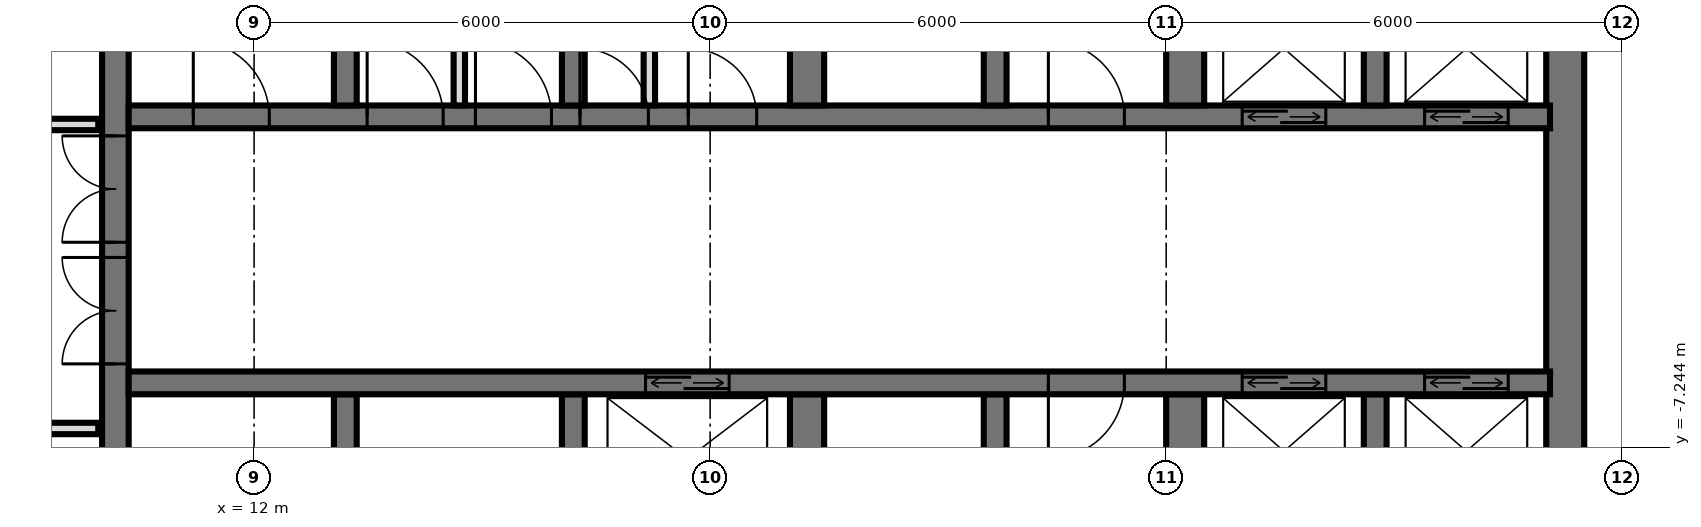
"""IFC4 building model, lengths in metres.
Left out: names, types, materials, properties, quantities, classifications, styles, units other than length and angle.
Written with IfcOpenShell. Run it as: python <this file> out.ifc"""

import sys

from ifc_helpers import new_model, si_unit, direction, frame, frame_2d, origin, place, context, subcontext, project, spatial, rectangle, extrude, element, fill, save


model = new_model("IFC4")
c1 = context("Model", 3, precision=1e-05, world=origin(), true_north=direction((0.0, 1.0)))
c2 = subcontext(c1, "Body", "Model", "MODEL_VIEW")
j1 = project(units=[si_unit("LENGTHUNIT", "METRE"), si_unit("PLANEANGLEUNIT", "RADIAN")], contexts=[c1])
p1 = place(None, origin())
s1 = spatial("IfcSite", under=j1, at=p1, CompositionType="ELEMENT")
p2 = place(p1, origin())
s2 = spatial("IfcBuilding", under=s1, at=p2, CompositionType="ELEMENT")
p3 = place(p2, frame((0.0, 0.0, 38.4)))
s3 = spatial("IfcBuildingStorey", under=s2, at=p3, CompositionType="ELEMENT", Elevation=38.4)
p4 = place(p3, frame((10.175, -14.55, 0.0), z_axis=(0.0, 0.0, 1.0), x_axis=(0.0, 1.0, 0.0)))
e1 = element("IfcWall", 1, at=p4, inside=s3, PredefinedType="SHEAR", context=c2, shape_type="SweptSolid", body=[
    extrude(rectangle(XDim=14.1, YDim=0.35, at=frame_2d((7.05, 0.0))), origin(), (0.0, 0.0, 1.0), 3.6),
])
p5 = place(p4, frame((8.4, 0.0, 0.0)))
e2 = element("IfcOpeningElement", 2, at=p5, cuts=e1, PredefinedType="OPENING", context=c2, shape_type="SweptSolid", body=[
    extrude(rectangle(XDim=1.4, YDim=2.4, at=frame_2d((0.7, 1.2))), frame((0.0, 0.185, 0.0), z_axis=(0.0, -1.0, 0.0), x_axis=(1.0, 0.0, 0.0)), (0.0, 0.0, 1.0), 0.37),
])
p6 = place(p4, frame((10.0, 0.0, 0.0)))
e3 = element("IfcOpeningElement", 3, at=p6, cuts=e1, PredefinedType="OPENING", context=c2, shape_type="SweptSolid", body=[
    extrude(rectangle(XDim=1.4, YDim=2.4, at=frame_2d((0.7, 1.2))), frame((0.0, 0.185, 0.0), z_axis=(0.0, -1.0, 0.0), x_axis=(1.0, 0.0, 0.0)), (0.0, 0.0, 1.0), 0.37),
])
p7 = place(p4, frame((4.0, 0.0, 0.0)))
e4 = element("IfcOpeningElement", 4, at=p7, cuts=e1, PredefinedType="OPENING", context=c2, shape_type="SweptSolid", body=[
    extrude(rectangle(XDim=1.2, YDim=2.1, at=frame_2d((0.6, 1.05))), frame((0.0, 0.185, 0.0), z_axis=(0.0, -1.0, 0.0), x_axis=(1.0, 0.0, 0.0)), (0.0, 0.0, 1.0), 0.37),
])
p8 = place(p3, frame((29.25, -14.55, 0.0), z_axis=(0.0, 0.0, 1.0), x_axis=(0.0, 1.0, 0.0)))
e5 = element("IfcWall", 5, at=p8, inside=s3, PredefinedType="SHEAR", context=c2, shape_type="SweptSolid", body=[
    extrude(rectangle(XDim=14.1, YDim=0.5, at=frame_2d((7.05, 0.0))), origin(), (0.0, 0.0, 1.0), 3.6),
])
p9 = place(p3, frame((10.35, -2.9, 0.0), z_axis=(0.0, 0.0, 1.0), x_axis=(1.0, 0.0, 0.0)))
e6 = element("IfcWall", 6, at=p9, inside=s3, PredefinedType="SHEAR", context=c2, shape_type="SweptSolid", body=[
    extrude(rectangle(XDim=18.7, YDim=0.3, at=frame_2d((9.35, 0.0))), origin(), (0.0, 0.0, 1.0), 3.6),
])
p10 = place(p9, frame((14.65, 0.0, 0.0)))
e7 = element("IfcOpeningElement", 7, at=p10, cuts=e6, PredefinedType="OPENING", context=c2, shape_type="SweptSolid", body=[
    extrude(rectangle(XDim=1.1, YDim=2.1, at=frame_2d((0.55, 1.05))), frame((0.0, 0.16, 0.0), z_axis=(0.0, -1.0, 0.0), x_axis=(1.0, 0.0, 0.0)), (0.0, 0.0, 1.0), 0.32),
])
p11 = place(p9, frame((17.05, 0.0, 0.0)))
e8 = element("IfcOpeningElement", 8, at=p11, cuts=e6, PredefinedType="OPENING", context=c2, shape_type="SweptSolid", body=[
    extrude(rectangle(XDim=1.1, YDim=2.1, at=frame_2d((0.55, 1.05))), frame((0.0, 0.16, 0.0), z_axis=(0.0, -1.0, 0.0), x_axis=(1.0, 0.0, 0.0)), (0.0, 0.0, 1.0), 0.32),
])
p12 = place(p9, frame((5.938, 0.0, 0.0)))
e9 = element("IfcOpeningElement", 9, at=p12, cuts=e6, PredefinedType="OPENING", context=c2, shape_type="SweptSolid", body=[
    extrude(rectangle(XDim=0.9, YDim=2.1, at=frame_2d((0.45, 1.05))), frame((0.0, 0.16, 0.0), z_axis=(0.0, -1.0, 0.0), x_axis=(1.0, 0.0, 0.0)), (0.0, 0.0, 1.0), 0.32),
])
p13 = place(p9, frame((7.363, 0.0, 0.0)))
e10 = element("IfcOpeningElement", 10, at=p13, cuts=e6, PredefinedType="OPENING", context=c2, shape_type="SweptSolid", body=[
    extrude(rectangle(XDim=0.9, YDim=2.1, at=frame_2d((0.45, 1.05))), frame((0.0, 0.16, 0.0), z_axis=(0.0, -1.0, 0.0), x_axis=(1.0, 0.0, 0.0)), (0.0, 0.0, 1.0), 0.32),
])
p14 = place(p9, frame((0.85, 0.0, 0.0)))
e11 = element("IfcOpeningElement", 11, at=p14, cuts=e6, PredefinedType="OPENING", context=c2, shape_type="SweptSolid", body=[
    extrude(rectangle(XDim=1.0, YDim=2.1, at=frame_2d((0.5, 1.05))), frame((0.0, 0.16, 0.0), z_axis=(0.0, -1.0, 0.0), x_axis=(1.0, 0.0, 0.0)), (0.0, 0.0, 1.0), 0.32),
])
p15 = place(p9, frame((3.137, 0.0, 0.0)))
e12 = element("IfcOpeningElement", 12, at=p15, cuts=e6, PredefinedType="OPENING", context=c2, shape_type="SweptSolid", body=[
    extrude(rectangle(XDim=1.0, YDim=2.1, at=frame_2d((0.5, 1.05))), frame((0.0, 0.16, 0.0), z_axis=(0.0, -1.0, 0.0), x_axis=(1.0, 0.0, 0.0)), (0.0, 0.0, 1.0), 0.32),
])
p16 = place(p9, frame((4.562, 0.0, 0.0)))
e13 = element("IfcOpeningElement", 13, at=p16, cuts=e6, PredefinedType="OPENING", context=c2, shape_type="SweptSolid", body=[
    extrude(rectangle(XDim=1.0, YDim=2.1, at=frame_2d((0.5, 1.05))), frame((0.0, 0.16, 0.0), z_axis=(0.0, -1.0, 0.0), x_axis=(1.0, 0.0, 0.0)), (0.0, 0.0, 1.0), 0.32),
])
p17 = place(p9, frame((12.1, 0.0, 0.0)))
e14 = element("IfcOpeningElement", 14, at=p17, cuts=e6, PredefinedType="OPENING", context=c2, shape_type="SweptSolid", body=[
    extrude(rectangle(XDim=1.0, YDim=2.1, at=frame_2d((0.5, 1.05))), frame((0.0, 0.16, 0.0), z_axis=(0.0, -1.0, 0.0), x_axis=(1.0, 0.0, 0.0)), (0.0, 0.0, 1.0), 0.32),
])
p18 = place(p3, frame((10.35, -6.4, 0.0), z_axis=(0.0, 0.0, 1.0), x_axis=(1.0, 0.0, 0.0)))
e15 = element("IfcWall", 15, at=p18, inside=s3, PredefinedType="SHEAR", context=c2, shape_type="SweptSolid", body=[
    extrude(rectangle(XDim=18.7, YDim=0.3, at=frame_2d((9.35, 0.0))), origin(), (0.0, 0.0, 1.0), 3.6),
])
p19 = place(p18, frame((14.65, 0.0, 0.0)))
e16 = element("IfcOpeningElement", 16, at=p19, cuts=e15, PredefinedType="OPENING", context=c2, shape_type="SweptSolid", body=[
    extrude(rectangle(XDim=1.1, YDim=2.1, at=frame_2d((0.55, 1.05))), frame((0.0, 0.16, 0.0), z_axis=(0.0, -1.0, 0.0), x_axis=(1.0, 0.0, 0.0)), (0.0, 0.0, 1.0), 0.32),
])
p20 = place(p18, frame((17.05, 0.0, 0.0)))
e17 = element("IfcOpeningElement", 17, at=p20, cuts=e15, PredefinedType="OPENING", context=c2, shape_type="SweptSolid", body=[
    extrude(rectangle(XDim=1.1, YDim=2.1, at=frame_2d((0.55, 1.05))), frame((0.0, 0.16, 0.0), z_axis=(0.0, -1.0, 0.0), x_axis=(1.0, 0.0, 0.0)), (0.0, 0.0, 1.0), 0.32),
])
p21 = place(p18, frame((6.8, 0.0, 0.0)))
e18 = element("IfcOpeningElement", 18, at=p21, cuts=e15, PredefinedType="OPENING", context=c2, shape_type="SweptSolid", body=[
    extrude(rectangle(XDim=1.1, YDim=2.1, at=frame_2d((0.55, 1.05))), frame((0.0, 0.16, 0.0), z_axis=(0.0, -1.0, 0.0), x_axis=(1.0, 0.0, 0.0)), (0.0, 0.0, 1.0), 0.32),
])
p22 = place(p18, frame((12.1, 0.0, 0.0)))
e19 = element("IfcOpeningElement", 19, at=p22, cuts=e15, PredefinedType="OPENING", context=c2, shape_type="SweptSolid", body=[
    extrude(rectangle(XDim=1.0, YDim=2.1, at=frame_2d((0.5, 1.05))), frame((0.0, 0.16, 0.0), z_axis=(0.0, -1.0, 0.0), x_axis=(1.0, 0.0, 0.0)), (0.0, 0.0, 1.0), 0.32),
])
for number, where, z_axis, x_axis in (
    (20, (13.2, -2.75, 0.0), (0.0, 0.0, 1.0), (0.0, 1.0, 0.0)),
    (21, (13.2, -8.85, 0.0), (0.0, 0.0, 1.0), (0.0, 1.0, 0.0)),
    (22, (16.2, -2.75, 0.0), (0.0, 0.0, 1.0), (0.0, 1.0, 0.0)),
    (23, (16.2, -8.85, 0.0), (0.0, 0.0, 1.0), (0.0, 1.0, 0.0)),
):
    element("IfcWall", number, at=place(p3, frame(where, z_axis=z_axis, x_axis=x_axis)), inside=s3, PredefinedType="SHEAR", context=c2, shape_type="SweptSolid", body=[
        extrude(rectangle(XDim=2.3, YDim=0.3, at=frame_2d((1.15, 0.0))), origin(), (0.0, 0.0, 1.0), 3.6),
    ])
for number, where, z_axis, x_axis in (
    (24, (19.275, -2.75, 0.0), (0.0, 0.0, 1.0), (0.0, 1.0, 0.0)),
    (25, (19.275, -8.85, 0.0), (0.0, 0.0, 1.0), (0.0, 1.0, 0.0)),
):
    element("IfcWall", number, at=place(p3, frame(where, z_axis=z_axis, x_axis=x_axis)), inside=s3, PredefinedType="SHEAR", context=c2, shape_type="SweptSolid", body=[
        extrude(rectangle(XDim=2.3, YDim=0.45, at=frame_2d((1.15, 0.0))), origin(), (0.0, 0.0, 1.0), 3.6),
    ])
for number, where, z_axis, x_axis in (
    (26, (21.75, -2.75, 0.0), (0.0, 0.0, 1.0), (0.0, 1.0, 0.0)),
    (27, (21.75, -8.85, 0.0), (0.0, 0.0, 1.0), (0.0, 1.0, 0.0)),
):
    element("IfcWall", number, at=place(p3, frame(where, z_axis=z_axis, x_axis=x_axis)), inside=s3, PredefinedType="SHEAR", context=c2, shape_type="SweptSolid", body=[
        extrude(rectangle(XDim=2.3, YDim=0.3, at=frame_2d((1.15, 0.0))), origin(), (0.0, 0.0, 1.0), 3.6),
    ])
for number, where, z_axis, x_axis in (
    (28, (24.25, -2.75, 0.0), (0.0, 0.0, 1.0), (0.0, 1.0, 0.0)),
    (29, (24.25, -8.85, 0.0), (0.0, 0.0, 1.0), (0.0, 1.0, 0.0)),
):
    element("IfcWall", number, at=place(p3, frame(where, z_axis=z_axis, x_axis=x_axis)), inside=s3, PredefinedType="SHEAR", context=c2, shape_type="SweptSolid", body=[
        extrude(rectangle(XDim=2.3, YDim=0.5, at=frame_2d((1.15, 0.0))), origin(), (0.0, 0.0, 1.0), 3.6),
    ])
for number, where, z_axis, x_axis in (
    (30, (26.75, -2.75, 0.0), (0.0, 0.0, 1.0), (0.0, 1.0, 0.0)),
    (31, (26.75, -8.85, 0.0), (0.0, 0.0, 1.0), (0.0, 1.0, 0.0)),
):
    element("IfcWall", number, at=place(p3, frame(where, z_axis=z_axis, x_axis=x_axis)), inside=s3, PredefinedType="SHEAR", context=c2, shape_type="SweptSolid", body=[
        extrude(rectangle(XDim=2.3, YDim=0.3, at=frame_2d((1.15, 0.0))), origin(), (0.0, 0.0, 1.0), 3.6),
    ])
for number, where, z_axis, x_axis in (
    (32, (17.2, -2.75, 0.0), (0.0, 0.0, 1.0), (0.0, 1.0, 0.0)),
    (33, (14.7, -2.75, 0.0), (0.0, 0.0, 1.0), (0.0, 1.0, 0.0)),
):
    element("IfcWall", number, at=place(p3, frame(where, z_axis=z_axis, x_axis=x_axis)), inside=s3, PredefinedType="PARTITIONING", context=c2, shape_type="SweptSolid", body=[
        extrude(rectangle(XDim=2.3, YDim=0.15, at=frame_2d((1.15, 0.0))), origin(), (0.0, 0.0, 1.0), 3.3),
    ])
p23 = place(p3, frame((-9.95, -7.0, 0.0), z_axis=(0.0, 0.0, 1.0), x_axis=(1.0, 0.0, 0.0)))
e34 = element("IfcWall", 34, at=p23, inside=s3, PredefinedType="PARTITIONING", context=c2, shape_type="SweptSolid", body=[
    extrude(rectangle(XDim=19.9, YDim=0.15, at=frame_2d((9.95, 0.0))), origin(), (0.0, 0.0, 1.0), 3.32),
])
p24 = place(p23, frame((9.45, 0.0, 0.0)))
e35 = element("IfcOpeningElement", 35, at=p24, cuts=e34, PredefinedType="OPENING", context=c2, shape_type="SweptSolid", body=[
    extrude(rectangle(XDim=1.0, YDim=2.1, at=frame_2d((0.5, 1.05))), frame((0.0, 0.085, 0.0), z_axis=(0.0, -1.0, 0.0), x_axis=(1.0, 0.0, 0.0)), (0.0, 0.0, 1.0), 0.17),
])
p25 = place(p23, frame((15.45, 0.0, 0.0)))
e36 = element("IfcOpeningElement", 36, at=p25, cuts=e34, PredefinedType="OPENING", context=c2, shape_type="SweptSolid", body=[
    extrude(rectangle(XDim=1.0, YDim=2.1, at=frame_2d((0.5, 1.05))), frame((0.0, 0.085, 0.0), z_axis=(0.0, -1.0, 0.0), x_axis=(1.0, 0.0, 0.0)), (0.0, 0.0, 1.0), 0.17),
])
p26 = place(p3, frame((-9.95, -3.0, 0.0), z_axis=(0.0, 0.0, 1.0), x_axis=(1.0, 0.0, 0.0)))
e37 = element("IfcWall", 37, at=p26, inside=s3, PredefinedType="PARTITIONING", context=c2, shape_type="SweptSolid", body=[
    extrude(rectangle(XDim=19.9, YDim=0.15, at=frame_2d((9.95, 0.0))), origin(), (0.0, 0.0, 1.0), 3.32),
])
p27 = place(p26, frame((1.7, 0.0, 0.0)))
e38 = element("IfcOpeningElement", 38, at=p27, cuts=e37, PredefinedType="OPENING", context=c2, shape_type="SweptSolid", body=[
    extrude(rectangle(XDim=1.0, YDim=2.1, at=frame_2d((0.5, 1.05))), frame((0.0, 0.085, 0.0), z_axis=(0.0, -1.0, 0.0), x_axis=(1.0, 0.0, 0.0)), (0.0, 0.0, 1.0), 0.17),
])
p28 = place(p26, frame((5.45, 0.0, 0.0)))
e39 = element("IfcOpeningElement", 39, at=p28, cuts=e37, PredefinedType="OPENING", context=c2, shape_type="SweptSolid", body=[
    extrude(rectangle(XDim=1.0, YDim=2.1, at=frame_2d((0.5, 1.05))), frame((0.0, 0.085, 0.0), z_axis=(0.0, -1.0, 0.0), x_axis=(1.0, 0.0, 0.0)), (0.0, 0.0, 1.0), 0.17),
])
p29 = place(p26, frame((8.2, 0.0, 0.0)))
e40 = element("IfcOpeningElement", 40, at=p29, cuts=e37, PredefinedType="OPENING", context=c2, shape_type="SweptSolid", body=[
    extrude(rectangle(XDim=1.0, YDim=2.1, at=frame_2d((0.5, 1.05))), frame((0.0, 0.085, 0.0), z_axis=(0.0, -1.0, 0.0), x_axis=(1.0, 0.0, 0.0)), (0.0, 0.0, 1.0), 0.17),
])
p30 = place(p26, frame((11.95, 0.0, 0.0)))
e41 = element("IfcOpeningElement", 41, at=p30, cuts=e37, PredefinedType="OPENING", context=c2, shape_type="SweptSolid", body=[
    extrude(rectangle(XDim=1.0, YDim=2.1, at=frame_2d((0.5, 1.05))), frame((0.0, 0.085, 0.0), z_axis=(0.0, -1.0, 0.0), x_axis=(1.0, 0.0, 0.0)), (0.0, 0.0, 1.0), 0.17),
])
p31 = place(p26, frame((16.95, 0.0, 0.0)))
e42 = element("IfcOpeningElement", 42, at=p31, cuts=e37, PredefinedType="OPENING", context=c2, shape_type="SweptSolid", body=[
    extrude(rectangle(XDim=1.0, YDim=2.1, at=frame_2d((0.5, 1.05))), frame((0.0, 0.085, 0.0), z_axis=(0.0, -1.0, 0.0), x_axis=(1.0, 0.0, 0.0)), (0.0, 0.0, 1.0), 0.17),
])
p32 = place(p10, origin())
e43 = element("IfcDoor", 43, at=p32, inside=s3, OperationType="DOUBLE_DOOR_SLIDING", PredefinedType="USERDEFINED", context=c2, shape_type="SweptSolid", body=[
    extrude(rectangle(XDim=1.1, YDim=2.1, at=frame_2d((0.55, 1.05))), frame((0.0, 0.025, 0.0), z_axis=(0.0, -1.0, 0.0), x_axis=(1.0, 0.0, 0.0)), (0.0, 0.0, 1.0), 0.05),
])
fill(e7, e43)
p33 = place(p11, origin())
e44 = element("IfcDoor", 44, at=p33, inside=s3, OperationType="DOUBLE_DOOR_SLIDING", PredefinedType="USERDEFINED", context=c2, shape_type="SweptSolid", body=[
    extrude(rectangle(XDim=1.1, YDim=2.1, at=frame_2d((0.55, 1.05))), frame((0.0, 0.025, 0.0), z_axis=(0.0, -1.0, 0.0), x_axis=(1.0, 0.0, 0.0)), (0.0, 0.0, 1.0), 0.05),
])
fill(e8, e44)
p34 = place(p19, origin())
e45 = element("IfcDoor", 45, at=p34, inside=s3, OperationType="DOUBLE_DOOR_SLIDING", PredefinedType="USERDEFINED", context=c2, shape_type="SweptSolid", body=[
    extrude(rectangle(XDim=1.1, YDim=2.1, at=frame_2d((0.55, 1.05))), frame((0.0, 0.025, 0.0), z_axis=(0.0, -1.0, 0.0), x_axis=(1.0, 0.0, 0.0)), (0.0, 0.0, 1.0), 0.05),
])
fill(e16, e45)
p35 = place(p20, origin())
e46 = element("IfcDoor", 46, at=p35, inside=s3, OperationType="DOUBLE_DOOR_SLIDING", PredefinedType="USERDEFINED", context=c2, shape_type="SweptSolid", body=[
    extrude(rectangle(XDim=1.1, YDim=2.1, at=frame_2d((0.55, 1.05))), frame((0.0, 0.025, 0.0), z_axis=(0.0, -1.0, 0.0), x_axis=(1.0, 0.0, 0.0)), (0.0, 0.0, 1.0), 0.05),
])
fill(e17, e46)
p36 = place(p21, origin())
e47 = element("IfcDoor", 47, at=p36, inside=s3, OperationType="DOUBLE_DOOR_SLIDING", PredefinedType="USERDEFINED", context=c2, shape_type="SweptSolid", body=[
    extrude(rectangle(XDim=1.1, YDim=2.1, at=frame_2d((0.55, 1.05))), frame((0.0, 0.025, 0.0), z_axis=(0.0, -1.0, 0.0), x_axis=(1.0, 0.0, 0.0)), (0.0, 0.0, 1.0), 0.05),
])
fill(e18, e47)
p37 = place(p5, origin())
e48 = element("IfcDoor", 48, at=p37, inside=s3, OperationType="DOUBLE_DOOR_SINGLE_SWING", PredefinedType="DOOR", context=c2, shape_type="SweptSolid", body=[
    extrude(rectangle(XDim=1.4, YDim=2.4, at=frame_2d((0.7, 1.2))), frame((0.0, 0.025, 0.0), z_axis=(0.0, -1.0, 0.0), x_axis=(1.0, 0.0, 0.0)), (0.0, 0.0, 1.0), 0.05),
])
fill(e2, e48)
p38 = place(p6, origin())
e49 = element("IfcDoor", 49, at=p38, inside=s3, OperationType="DOUBLE_DOOR_SINGLE_SWING", PredefinedType="DOOR", context=c2, shape_type="SweptSolid", body=[
    extrude(rectangle(XDim=1.4, YDim=2.4, at=frame_2d((0.7, 1.2))), frame((0.0, 0.025, 0.0), z_axis=(0.0, -1.0, 0.0), x_axis=(1.0, 0.0, 0.0)), (0.0, 0.0, 1.0), 0.05),
])
fill(e3, e49)
p39 = place(p12, origin())
e50 = element("IfcDoor", 50, at=p39, inside=s3, OperationType="SINGLE_SWING_RIGHT", PredefinedType="DOOR", context=c2, shape_type="SweptSolid", body=[
    extrude(rectangle(XDim=0.9, YDim=2.1, at=frame_2d((0.45, 1.05))), frame((0.0, 0.025, 0.0), z_axis=(0.0, -1.0, 0.0), x_axis=(1.0, 0.0, 0.0)), (0.0, 0.0, 1.0), 0.05),
])
fill(e9, e50)
p40 = place(p13, origin())
e51 = element("IfcDoor", 51, at=p40, inside=s3, OperationType="SINGLE_SWING_RIGHT", PredefinedType="DOOR", context=c2, shape_type="SweptSolid", body=[
    extrude(rectangle(XDim=0.9, YDim=2.1, at=frame_2d((0.45, 1.05))), frame((0.0, 0.025, 0.0), z_axis=(0.0, -1.0, 0.0), x_axis=(1.0, 0.0, 0.0)), (0.0, 0.0, 1.0), 0.05),
])
fill(e10, e51)
p41 = place(p14, origin())
e52 = element("IfcDoor", 52, at=p41, inside=s3, OperationType="SINGLE_SWING_RIGHT", PredefinedType="DOOR", context=c2, shape_type="SweptSolid", body=[
    extrude(rectangle(XDim=1.0, YDim=2.1, at=frame_2d((0.5, 1.05))), frame((0.0, 0.025, 0.0), z_axis=(0.0, -1.0, 0.0), x_axis=(1.0, 0.0, 0.0)), (0.0, 0.0, 1.0), 0.05),
])
fill(e11, e52)
p42 = place(p15, origin())
e53 = element("IfcDoor", 53, at=p42, inside=s3, OperationType="SINGLE_SWING_RIGHT", PredefinedType="DOOR", context=c2, shape_type="SweptSolid", body=[
    extrude(rectangle(XDim=1.0, YDim=2.1, at=frame_2d((0.5, 1.05))), frame((0.0, 0.025, 0.0), z_axis=(0.0, -1.0, 0.0), x_axis=(1.0, 0.0, 0.0)), (0.0, 0.0, 1.0), 0.05),
])
fill(e12, e53)
p43 = place(p16, origin())
e54 = element("IfcDoor", 54, at=p43, inside=s3, OperationType="SINGLE_SWING_RIGHT", PredefinedType="DOOR", context=c2, shape_type="SweptSolid", body=[
    extrude(rectangle(XDim=1.0, YDim=2.1, at=frame_2d((0.5, 1.05))), frame((0.0, 0.025, 0.0), z_axis=(0.0, -1.0, 0.0), x_axis=(1.0, 0.0, 0.0)), (0.0, 0.0, 1.0), 0.05),
])
fill(e13, e54)
p44 = place(p17, origin())
e55 = element("IfcDoor", 55, at=p44, inside=s3, OperationType="SINGLE_SWING_RIGHT", PredefinedType="DOOR", context=c2, shape_type="SweptSolid", body=[
    extrude(rectangle(XDim=1.0, YDim=2.1, at=frame_2d((0.5, 1.05))), frame((0.0, 0.025, 0.0), z_axis=(0.0, -1.0, 0.0), x_axis=(1.0, 0.0, 0.0)), (0.0, 0.0, 1.0), 0.05),
])
fill(e14, e55)
p45 = place(p22, frame((0.5, 0.0, 0.0), z_axis=(0.0, 0.0, 1.0), x_axis=(-1.0, 0.0, 0.0)))
e56 = element("IfcDoor", 56, at=p45, inside=s3, OperationType="SINGLE_SWING_LEFT", PredefinedType="DOOR", context=c2, shape_type="SweptSolid", body=[
    extrude(rectangle(XDim=1.0, YDim=2.1, at=frame_2d((0.0, 1.05))), frame((0.0, -0.025, 0.0), z_axis=(0.0, 1.0, 0.0), x_axis=(-1.0, 0.0, 0.0)), (0.0, 0.0, 1.0), 0.05),
])
fill(e19, e56)
save(model, sys.argv[1])
